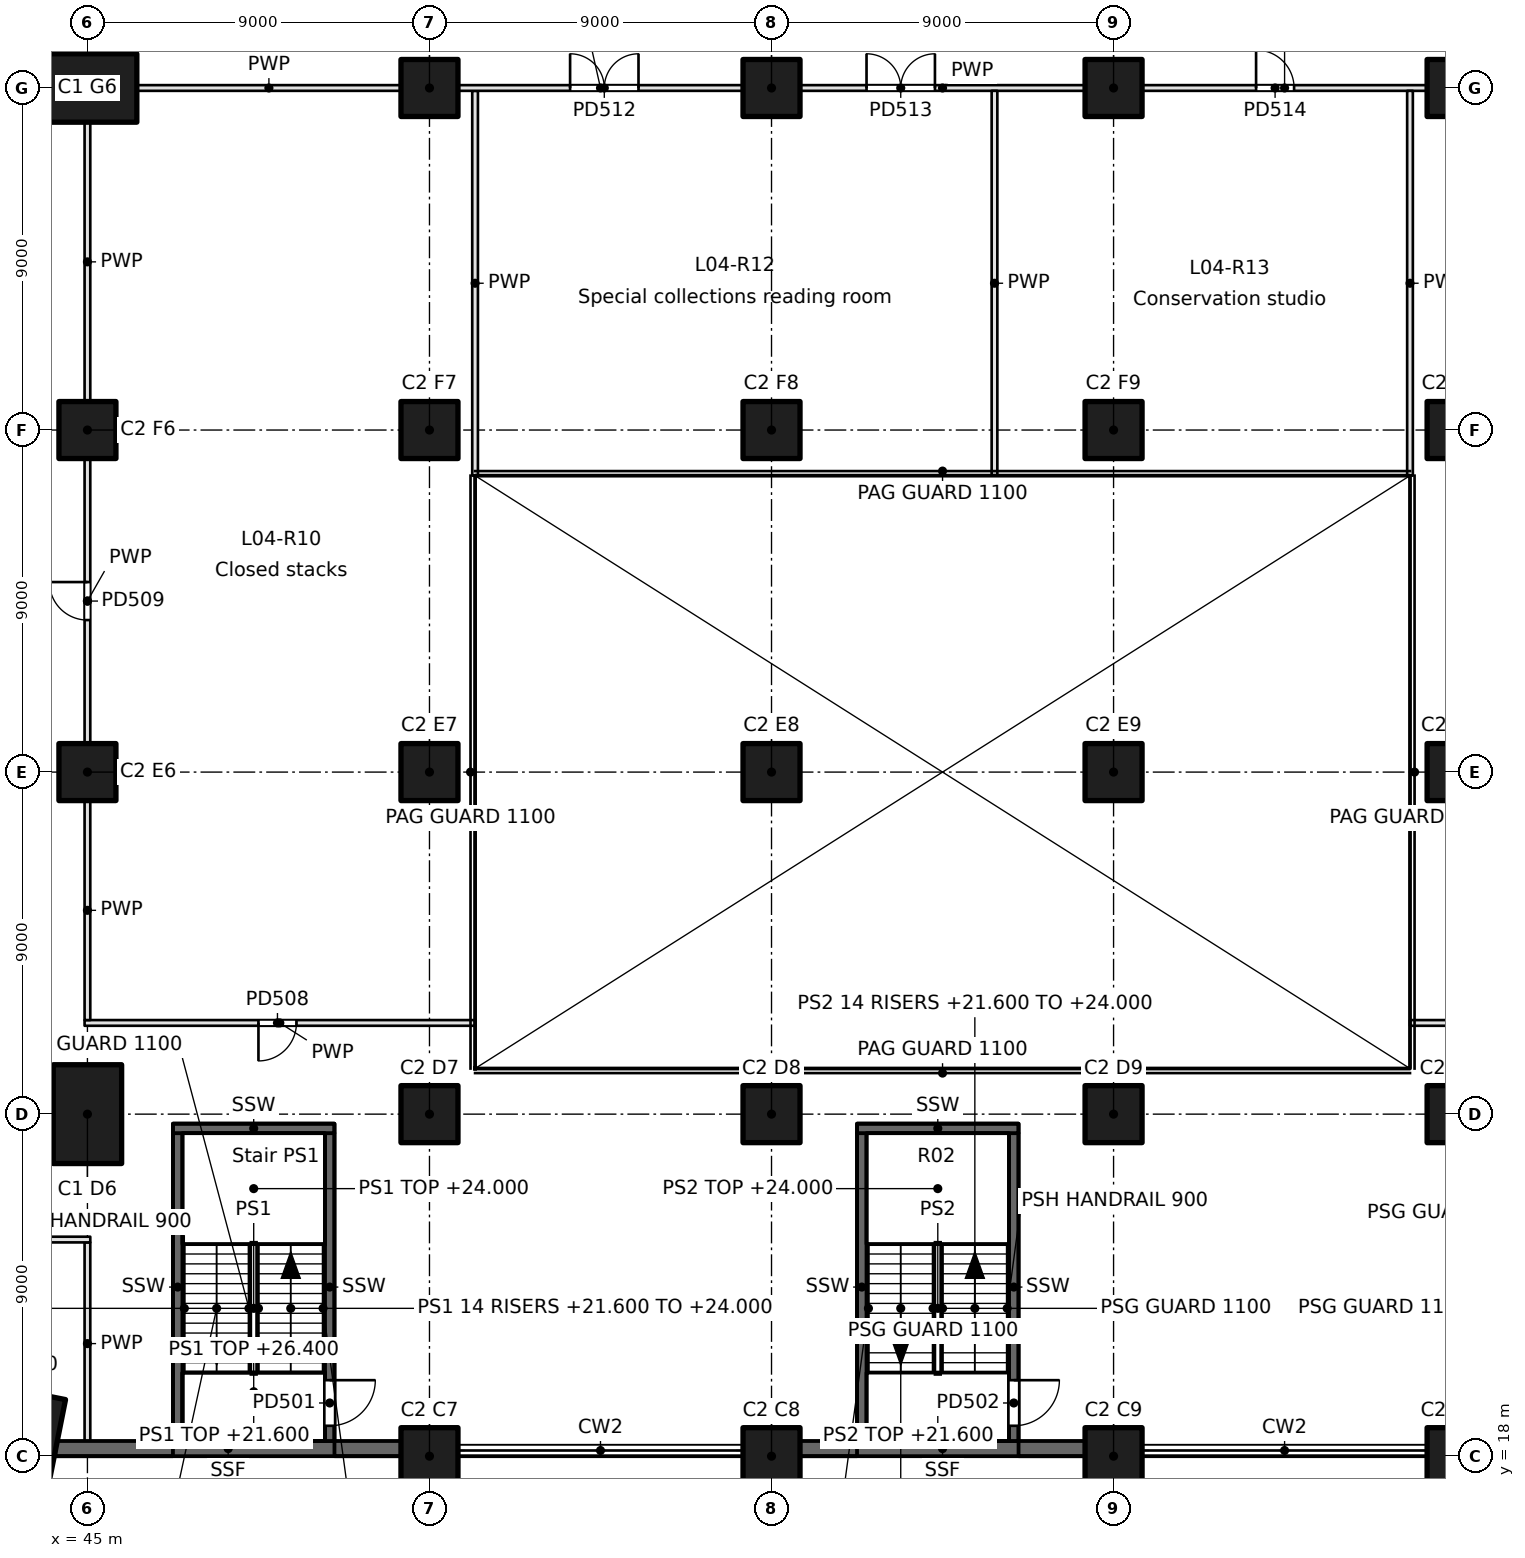
"""IFC4 building model, lengths in metres.
Left out: names, types, materials, properties, quantities, classifications, styles, units other than length and angle.
Written with IfcOpenShell. Run it as: python <this file> out.ifc"""

import sys

from ifc_helpers import new_model, si_unit, direction, frame, frame_2d, origin, origin_2d, place, context, subcontext, project, spatial, rectangle, extrude, element, fill, save


model = new_model("IFC4")
c1 = context("Model", 3, precision=1e-05, world=origin(), true_north=direction((0.0, 1.0)))
c2 = subcontext(c1, "Body", "Model", "MODEL_VIEW")
j1 = project(units=[si_unit("LENGTHUNIT", "METRE"), si_unit("PLANEANGLEUNIT", "RADIAN")], contexts=[c1])
p1 = place(None, origin())
s1 = spatial("IfcSite", under=j1, at=p1, CompositionType="ELEMENT")
p2 = place(p1, origin())
s2 = spatial("IfcBuilding", under=s1, at=p2, CompositionType="ELEMENT")
p3 = place(p2, frame((0.0, 0.0, 21.6)))
s3 = spatial("IfcBuildingStorey", under=s2, at=p3, CompositionType="ELEMENT", Elevation=21.6)
for number, where, z_axis, x_axis in (
    (1, (43.287, 18.39, 0.0), (0.0, 0.0, 1.0), (0.195, 0.981, 0.0)),
    (2, (45.0, 27.0, 0.0), (0.0, 0.0, 1.0), (0.0, 1.0, 0.0)),
):
    element("IfcColumn", number, at=place(p3, frame(where, z_axis=z_axis, x_axis=x_axis)), inside=s3, PredefinedType="COLUMN", context=c2, shape_type="SweptSolid", body=[
        extrude(rectangle(XDim=2.6, YDim=1.8, at=origin_2d()), origin(), (0.0, 0.0, 1.0), 4.8),
    ])
for number, where, z_axis, x_axis in (
    (3, (45.0, 36.0, 0.0), (0.0, 0.0, 1.0), (1.0, 0.0, 0.0)),
    (4, (45.0, 45.0, 0.0), (0.0, 0.0, 1.0), (1.0, 0.0, 0.0)),
):
    element("IfcColumn", number, at=place(p3, frame(where, z_axis=z_axis, x_axis=x_axis)), inside=s3, PredefinedType="COLUMN", context=c2, shape_type="SweptSolid", body=[
        extrude(rectangle(XDim=1.5, YDim=1.5, at=origin_2d()), origin(), (0.0, 0.0, 1.0), 4.8),
    ])
p4 = place(p3, frame((45.0, 54.0, 0.0), z_axis=(0.0, 0.0, 1.0), x_axis=(1.0, 0.0, 0.0)))
e5 = element("IfcColumn", 5, at=p4, inside=s3, PredefinedType="COLUMN", context=c2, shape_type="SweptSolid", body=[
    extrude(rectangle(XDim=2.6, YDim=1.8, at=origin_2d()), origin(), (0.0, 0.0, 1.0), 4.8),
])
for number, where, z_axis, x_axis in (
    (6, (54.0, 54.0, 0.0), (0.0, 0.0, 1.0), (1.0, 0.0, 0.0)),
    (7, (63.0, 54.0, 0.0), (0.0, 0.0, 1.0), (1.0, 0.0, 0.0)),
    (8, (72.0, 54.0, 0.0), (0.0, 0.0, 1.0), (1.0, 0.0, 0.0)),
    (9, (81.0, 54.0, 0.0), (0.0, 0.0, 1.0), (1.0, 0.0, 0.0)),
    (10, (54.0, 18.0, 0.0), (0.0, 0.0, 1.0), (1.0, 0.0, 0.0)),
    (11, (63.0, 18.0, 0.0), (0.0, 0.0, 1.0), (1.0, 0.0, 0.0)),
    (12, (72.0, 18.0, 0.0), (0.0, 0.0, 1.0), (1.0, 0.0, 0.0)),
    (13, (81.0, 18.0, 0.0), (0.0, 0.0, 1.0), (1.0, 0.0, 0.0)),
    (14, (54.0, 27.0, 0.0), (0.0, 0.0, 1.0), (1.0, 0.0, 0.0)),
    (15, (54.0, 36.0, 0.0), (0.0, 0.0, 1.0), (1.0, 0.0, 0.0)),
    (16, (54.0, 45.0, 0.0), (0.0, 0.0, 1.0), (1.0, 0.0, 0.0)),
    (17, (63.0, 27.0, 0.0), (0.0, 0.0, 1.0), (1.0, 0.0, 0.0)),
    (18, (63.0, 36.0, 0.0), (0.0, 0.0, 1.0), (1.0, 0.0, 0.0)),
    (19, (63.0, 45.0, 0.0), (0.0, 0.0, 1.0), (1.0, 0.0, 0.0)),
    (20, (72.0, 27.0, 0.0), (0.0, 0.0, 1.0), (1.0, 0.0, 0.0)),
    (21, (72.0, 36.0, 0.0), (0.0, 0.0, 1.0), (1.0, 0.0, 0.0)),
    (22, (72.0, 45.0, 0.0), (0.0, 0.0, 1.0), (1.0, 0.0, 0.0)),
    (23, (81.0, 27.0, 0.0), (0.0, 0.0, 1.0), (1.0, 0.0, 0.0)),
    (24, (81.0, 36.0, 0.0), (0.0, 0.0, 1.0), (1.0, 0.0, 0.0)),
    (25, (81.0, 45.0, 0.0), (0.0, 0.0, 1.0), (1.0, 0.0, 0.0)),
):
    element("IfcColumn", number, at=place(p3, frame(where, z_axis=z_axis, x_axis=x_axis)), inside=s3, PredefinedType="COLUMN", context=c2, shape_type="SweptSolid", body=[
        extrude(rectangle(XDim=1.5, YDim=1.5, at=origin_2d()), origin(), (0.0, 0.0, 1.0), 4.8),
    ])
p5 = place(p3, frame((47.375, 18.4, 0.0), z_axis=(0.0, 0.0, 1.0), x_axis=(0.0, 1.0, 0.0)))
e26 = element("IfcWall", 26, at=p5, inside=s3, PredefinedType="SOLIDWALL", context=c2, shape_type="SweptSolid", body=[
    extrude(rectangle(XDim=8.1, YDim=0.25, at=frame_2d((4.05, 0.0))), origin(), (0.0, 0.0, 1.0), 4.8),
])
p6 = place(p3, frame((51.375, 26.5, 0.0), z_axis=(0.0, 0.0, 1.0), x_axis=(0.0, -1.0, 0.0)))
e27 = element("IfcWall", 27, at=p6, inside=s3, PredefinedType="SOLIDWALL", context=c2, shape_type="SweptSolid", body=[
    extrude(rectangle(XDim=8.1, YDim=0.25, at=frame_2d((4.05, 0.0))), origin(), (0.0, 0.0, 1.0), 4.8),
])
p7 = place(p6, frame((6.5, 0.0, 0.0)))
e28 = element("IfcOpeningElement", 28, at=p7, cuts=e27, PredefinedType="OPENING", context=c2, shape_type="SweptSolid", body=[
    extrude(rectangle(XDim=1.2, YDim=2.1, at=frame_2d((0.6, 1.05))), frame((0.0, 0.125, 0.0), z_axis=(0.0, -1.0, 0.0), x_axis=(1.0, 0.0, 0.0)), (0.0, 0.0, 1.0), 0.25),
])
p8 = place(p3, frame((47.25, 26.625, 0.0), z_axis=(0.0, 0.0, 1.0), x_axis=(1.0, 0.0, 0.0)))
e29 = element("IfcWall", 29, at=p8, inside=s3, PredefinedType="SOLIDWALL", context=c2, shape_type="SweptSolid", body=[
    extrude(rectangle(XDim=4.25, YDim=0.25, at=frame_2d((2.125, 0.0))), origin(), (0.0, 0.0, 1.0), 4.8),
])
p9 = place(p3, frame((65.375, 18.4, 0.0), z_axis=(0.0, 0.0, 1.0), x_axis=(0.0, 1.0, 0.0)))
e30 = element("IfcWall", 30, at=p9, inside=s3, PredefinedType="SOLIDWALL", context=c2, shape_type="SweptSolid", body=[
    extrude(rectangle(XDim=8.1, YDim=0.25, at=frame_2d((4.05, 0.0))), origin(), (0.0, 0.0, 1.0), 4.8),
])
p10 = place(p3, frame((69.375, 26.5, 0.0), z_axis=(0.0, 0.0, 1.0), x_axis=(0.0, -1.0, 0.0)))
e31 = element("IfcWall", 31, at=p10, inside=s3, PredefinedType="SOLIDWALL", context=c2, shape_type="SweptSolid", body=[
    extrude(rectangle(XDim=8.1, YDim=0.25, at=frame_2d((4.05, 0.0))), origin(), (0.0, 0.0, 1.0), 4.8),
])
p11 = place(p10, frame((6.5, 0.0, 0.0)))
e32 = element("IfcOpeningElement", 32, at=p11, cuts=e31, PredefinedType="OPENING", context=c2, shape_type="SweptSolid", body=[
    extrude(rectangle(XDim=1.2, YDim=2.1, at=frame_2d((0.6, 1.05))), frame((0.0, 0.125, 0.0), z_axis=(0.0, -1.0, 0.0), x_axis=(1.0, 0.0, 0.0)), (0.0, 0.0, 1.0), 0.25),
])
p12 = place(p3, frame((65.25, 26.625, 0.0), z_axis=(0.0, 0.0, 1.0), x_axis=(1.0, 0.0, 0.0)))
e33 = element("IfcWall", 33, at=p12, inside=s3, PredefinedType="SOLIDWALL", context=c2, shape_type="SweptSolid", body=[
    extrude(rectangle(XDim=4.25, YDim=0.25, at=frame_2d((2.125, 0.0))), origin(), (0.0, 0.0, 1.0), 4.8),
])
p13 = place(p3, frame((53.25, 18.2, 0.0), z_axis=(0.0, 0.0, 1.0), x_axis=(-1.0, 0.0, 0.0)))
e34 = element("IfcWall", 34, at=p13, inside=s3, PredefinedType="SOLIDWALL", context=c2, shape_type="SweptSolid", body=[
    extrude(rectangle(XDim=9.093, YDim=0.4, at=frame_2d((4.546, 0.0))), origin(), (0.0, 0.0, 1.0), 4.45),
])
p14 = place(p3, frame((71.25, 18.2, 0.0), z_axis=(0.0, 0.0, 1.0), x_axis=(-1.0, 0.0, 0.0)))
e35 = element("IfcWall", 35, at=p14, inside=s3, PredefinedType="SOLIDWALL", context=c2, shape_type="SweptSolid", body=[
    extrude(rectangle(XDim=7.5, YDim=0.4, at=frame_2d((3.75, 0.0))), origin(), (0.0, 0.0, 1.0), 4.45),
])
p15 = place(p3, frame((55.2, 43.8, 0.0), z_axis=(0.0, 0.0, 1.0), x_axis=(0.0, 1.0, 0.0)))
e36 = element("IfcWall", 36, at=p15, inside=s3, PredefinedType="PARTITIONING", context=c2, shape_type="SweptSolid", body=[
    extrude(rectangle(XDim=10.125, YDim=0.15, at=frame_2d((5.062, 0.0))), origin(), (0.0, 0.0, 1.0), 4.45),
])
p16 = place(p3, frame((55.2, 29.4, 0.0), z_axis=(0.0, 0.0, 1.0), x_axis=(-1.0, 0.0, 0.0)))
e37 = element("IfcWall", 37, at=p16, inside=s3, PredefinedType="PARTITIONING", context=c2, shape_type="SweptSolid", body=[
    extrude(rectangle(XDim=10.275, YDim=0.15, at=frame_2d((5.137, 0.0))), origin(), (0.0, 0.0, 1.0), 4.45),
])
p17 = place(p16, frame((4.7, 0.0, 0.0)))
e38 = element("IfcOpeningElement", 38, at=p17, cuts=e37, PredefinedType="OPENING", context=c2, shape_type="SweptSolid", body=[
    extrude(rectangle(XDim=1.0, YDim=2.1, at=frame_2d((0.5, 1.05))), frame((0.0, 0.075, 0.0), z_axis=(0.0, -1.0, 0.0), x_axis=(1.0, 0.0, 0.0)), (0.0, 0.0, 1.0), 0.15),
])
p18 = place(p3, frame((89.82, 29.4, 0.0), z_axis=(0.0, 0.0, 1.0), x_axis=(-1.0, 0.0, 0.0)))
e39 = element("IfcWall", 39, at=p18, inside=s3, PredefinedType="PARTITIONING", context=c2, shape_type="SweptSolid", body=[
    extrude(rectangle(XDim=10.02, YDim=0.15, at=frame_2d((5.01, 0.0))), origin(), (0.0, 0.0, 1.0), 4.45),
])
p19 = place(p18, frame((4.52, 0.0, 0.0)))
e40 = element("IfcOpeningElement", 40, at=p19, cuts=e39, PredefinedType="OPENING", context=c2, shape_type="SweptSolid", body=[
    extrude(rectangle(XDim=1.0, YDim=2.1, at=frame_2d((0.5, 1.05))), frame((0.0, 0.075, 0.0), z_axis=(0.0, -1.0, 0.0), x_axis=(1.0, 0.0, 0.0)), (0.0, 0.0, 1.0), 0.15),
])
p20 = place(p3, frame((45.0, 23.625, 0.0), z_axis=(0.0, 0.0, 1.0), x_axis=(0.0, -1.0, 0.0)))
e41 = element("IfcWall", 41, at=p20, inside=s3, PredefinedType="PARTITIONING", context=c2, shape_type="SweptSolid", body=[
    extrude(rectangle(XDim=5.325, YDim=0.15, at=frame_2d((2.663, 0.0))), origin(), (0.0, 0.0, 1.0), 4.45),
])
p21 = place(p3, frame((45.0, 29.475, 0.0), z_axis=(0.0, 0.0, 1.0), x_axis=(0.0, 1.0, 0.0)))
e42 = element("IfcWall", 42, at=p21, inside=s3, PredefinedType="PARTITIONING", context=c2, shape_type="SweptSolid", body=[
    extrude(rectangle(XDim=5.775, YDim=0.15, at=frame_2d((2.887, 0.0))), origin(), (0.0, 0.0, 1.0), 4.45),
])
p22 = place(p3, frame((45.0, 36.75, 0.0), z_axis=(0.0, 0.0, 1.0), x_axis=(0.0, 1.0, 0.0)))
e43 = element("IfcWall", 43, at=p22, inside=s3, PredefinedType="PARTITIONING", context=c2, shape_type="SweptSolid", body=[
    extrude(rectangle(XDim=7.5, YDim=0.15, at=frame_2d((3.75, 0.0))), origin(), (0.0, 0.0, 1.0), 4.45),
])
p23 = place(p22, frame((3.25, 0.0, 0.0)))
e44 = element("IfcOpeningElement", 44, at=p23, cuts=e43, PredefinedType="OPENING", context=c2, shape_type="SweptSolid", body=[
    extrude(rectangle(XDim=1.0, YDim=2.1, at=frame_2d((0.5, 1.05))), frame((0.0, 0.075, 0.0), z_axis=(0.0, -1.0, 0.0), x_axis=(1.0, 0.0, 0.0)), (0.0, 0.0, 1.0), 0.15),
])
p24 = place(p3, frame((45.0, 45.75, 0.0), z_axis=(0.0, 0.0, 1.0), x_axis=(0.0, 1.0, 0.0)))
e45 = element("IfcWall", 45, at=p24, inside=s3, PredefinedType="PARTITIONING", context=c2, shape_type="SweptSolid", body=[
    extrude(rectangle(XDim=7.35, YDim=0.15, at=frame_2d((3.675, 0.0))), origin(), (0.0, 0.0, 1.0), 4.45),
])
p25 = place(p3, frame((46.3, 54.0, 0.0), z_axis=(0.0, 0.0, 1.0), x_axis=(1.0, 0.0, 0.0)))
e46 = element("IfcWall", 46, at=p25, inside=s3, PredefinedType="PARTITIONING", context=c2, shape_type="SweptSolid", body=[
    extrude(rectangle(XDim=6.95, YDim=0.15, at=frame_2d((3.475, 0.0))), origin(), (0.0, 0.0, 1.0), 4.45),
])
p26 = place(p3, frame((54.75, 54.0, 0.0), z_axis=(0.0, 0.0, 1.0), x_axis=(1.0, 0.0, 0.0)))
e47 = element("IfcWall", 47, at=p26, inside=s3, PredefinedType="PARTITIONING", context=c2, shape_type="SweptSolid", body=[
    extrude(rectangle(XDim=7.5, YDim=0.15, at=frame_2d((3.75, 0.0))), origin(), (0.0, 0.0, 1.0), 4.45),
])
p27 = place(p26, frame((2.95, 0.0, 0.0)))
e48 = element("IfcOpeningElement", 48, at=p27, cuts=e47, PredefinedType="OPENING", context=c2, shape_type="SweptSolid", body=[
    extrude(rectangle(XDim=1.8, YDim=2.1, at=frame_2d((0.9, 1.05))), frame((0.0, 0.075, 0.0), z_axis=(0.0, -1.0, 0.0), x_axis=(1.0, 0.0, 0.0)), (0.0, 0.0, 1.0), 0.15),
])
p28 = place(p3, frame((63.75, 54.0, 0.0), z_axis=(0.0, 0.0, 1.0), x_axis=(1.0, 0.0, 0.0)))
e49 = element("IfcWall", 49, at=p28, inside=s3, PredefinedType="PARTITIONING", context=c2, shape_type="SweptSolid", body=[
    extrude(rectangle(XDim=7.5, YDim=0.15, at=frame_2d((3.75, 0.0))), origin(), (0.0, 0.0, 1.0), 4.45),
])
p29 = place(p28, frame((1.75, 0.0, 0.0)))
e50 = element("IfcOpeningElement", 50, at=p29, cuts=e49, PredefinedType="OPENING", context=c2, shape_type="SweptSolid", body=[
    extrude(rectangle(XDim=1.8, YDim=2.1, at=frame_2d((0.9, 1.05))), frame((0.0, 0.075, 0.0), z_axis=(0.0, -1.0, 0.0), x_axis=(1.0, 0.0, 0.0)), (0.0, 0.0, 1.0), 0.15),
])
p30 = place(p3, frame((72.75, 54.0, 0.0), z_axis=(0.0, 0.0, 1.0), x_axis=(1.0, 0.0, 0.0)))
e51 = element("IfcWall", 51, at=p30, inside=s3, PredefinedType="PARTITIONING", context=c2, shape_type="SweptSolid", body=[
    extrude(rectangle(XDim=7.5, YDim=0.15, at=frame_2d((3.75, 0.0))), origin(), (0.0, 0.0, 1.0), 4.45),
])
p31 = place(p30, frame((3.0, 0.0, 0.0)))
e52 = element("IfcOpeningElement", 52, at=p31, cuts=e51, PredefinedType="OPENING", context=c2, shape_type="SweptSolid", body=[
    extrude(rectangle(XDim=1.0, YDim=2.1, at=frame_2d((0.5, 1.05))), frame((0.0, 0.075, 0.0), z_axis=(0.0, -1.0, 0.0), x_axis=(1.0, 0.0, 0.0)), (0.0, 0.0, 1.0), 0.15),
])
for number, where, z_axis, x_axis in (
    (53, (79.8, 43.8, 0.0), (0.0, 0.0, 1.0), (0.0, 1.0, 0.0)),
    (54, (68.867, 43.8, 0.0), (0.0, 0.0, 1.0), (0.0, 1.0, 0.0)),
):
    element("IfcWall", number, at=place(p3, frame(where, z_axis=z_axis, x_axis=x_axis)), inside=s3, PredefinedType="PARTITIONING", context=c2, shape_type="SweptSolid", body=[
        extrude(rectangle(XDim=10.125, YDim=0.15, at=frame_2d((5.062, 0.0))), origin(), (0.0, 0.0, 1.0), 4.45),
    ])
p32 = place(p3, frame((21.58, 23.7, 0.0), z_axis=(0.0, 0.0, 1.0), x_axis=(1.0, 0.0, 0.0)))
e55 = element("IfcWall", 55, at=p32, inside=s3, PredefinedType="PARTITIONING", context=c2, shape_type="SweptSolid", body=[
    extrude(rectangle(XDim=23.495, YDim=0.15, at=frame_2d((11.748, 0.0))), origin(), (0.0, 0.0, 1.0), 4.45),
])
p33 = place(p32, frame((1.25, 0.0, 0.0)))
e56 = element("IfcOpeningElement", 56, at=p33, cuts=e55, PredefinedType="OPENING", context=c2, shape_type="SweptSolid", body=[
    extrude(rectangle(XDim=1.8, YDim=2.1, at=frame_2d((0.9, 1.05))), frame((0.0, 0.075, 0.0), z_axis=(0.0, -1.0, 0.0), x_axis=(1.0, 0.0, 0.0)), (0.0, 0.0, 1.0), 0.15),
])
p34 = place(p32, frame((8.634, 0.0, 0.0)))
e57 = element("IfcOpeningElement", 57, at=p34, cuts=e55, PredefinedType="OPENING", context=c2, shape_type="SweptSolid", body=[
    extrude(rectangle(XDim=1.8, YDim=2.1, at=frame_2d((0.9, 1.05))), frame((0.0, 0.075, 0.0), z_axis=(0.0, -1.0, 0.0), x_axis=(1.0, 0.0, 0.0)), (0.0, 0.0, 1.0), 0.15),
])
p35 = place(p32, frame((18.599, 0.0, 0.0)))
e58 = element("IfcOpeningElement", 58, at=p35, cuts=e55, PredefinedType="OPENING", context=c2, shape_type="SweptSolid", body=[
    extrude(rectangle(XDim=1.0, YDim=2.1, at=frame_2d((0.5, 1.05))), frame((0.0, 0.075, 0.0), z_axis=(0.0, -1.0, 0.0), x_axis=(1.0, 0.0, 0.0)), (0.0, 0.0, 1.0), 0.15),
])
p36 = place(p7, origin())
e59 = element("IfcDoor", 59, at=p36, inside=s3, OperationType="SINGLE_SWING_LEFT", PredefinedType="DOOR", context=c2, shape_type="SweptSolid", body=[
    extrude(rectangle(XDim=1.2, YDim=2.1, at=frame_2d((0.6, 1.05))), frame((0.0, 0.025, 0.0), z_axis=(0.0, -1.0, 0.0), x_axis=(1.0, 0.0, 0.0)), (0.0, 0.0, 1.0), 0.05),
])
fill(e28, e59)
p37 = place(p11, origin())
e60 = element("IfcDoor", 60, at=p37, inside=s3, OperationType="SINGLE_SWING_LEFT", PredefinedType="DOOR", context=c2, shape_type="SweptSolid", body=[
    extrude(rectangle(XDim=1.2, YDim=2.1, at=frame_2d((0.6, 1.05))), frame((0.0, 0.025, 0.0), z_axis=(0.0, -1.0, 0.0), x_axis=(1.0, 0.0, 0.0)), (0.0, 0.0, 1.0), 0.05),
])
fill(e32, e60)
p38 = place(p17, origin())
e61 = element("IfcDoor", 61, at=p38, inside=s3, OperationType="SINGLE_SWING_RIGHT", PredefinedType="DOOR", context=c2, shape_type="SweptSolid", body=[
    extrude(rectangle(XDim=1.0, YDim=2.1, at=frame_2d((0.5, 1.05))), frame((0.0, 0.025, 0.0), z_axis=(0.0, -1.0, 0.0), x_axis=(1.0, 0.0, 0.0)), (0.0, 0.0, 1.0), 0.05),
])
fill(e38, e61)
p39 = place(p23, origin())
e62 = element("IfcDoor", 62, at=p39, inside=s3, OperationType="SINGLE_SWING_RIGHT", PredefinedType="DOOR", context=c2, shape_type="SweptSolid", body=[
    extrude(rectangle(XDim=1.0, YDim=2.1, at=frame_2d((0.5, 1.05))), frame((0.0, 0.025, 0.0), z_axis=(0.0, -1.0, 0.0), x_axis=(1.0, 0.0, 0.0)), (0.0, 0.0, 1.0), 0.05),
])
fill(e44, e62)
p40 = place(p27, origin())
e63 = element("IfcDoor", 63, at=p40, inside=s3, OperationType="DOUBLE_DOOR_SINGLE_SWING", PredefinedType="DOOR", context=c2, shape_type="SweptSolid", body=[
    extrude(rectangle(XDim=1.8, YDim=2.1, at=frame_2d((0.9, 1.05))), frame((0.0, 0.025, 0.0), z_axis=(0.0, -1.0, 0.0), x_axis=(1.0, 0.0, 0.0)), (0.0, 0.0, 1.0), 0.05),
])
fill(e48, e63)
p41 = place(p29, origin())
e64 = element("IfcDoor", 64, at=p41, inside=s3, OperationType="DOUBLE_DOOR_SINGLE_SWING", PredefinedType="DOOR", context=c2, shape_type="SweptSolid", body=[
    extrude(rectangle(XDim=1.8, YDim=2.1, at=frame_2d((0.9, 1.05))), frame((0.0, 0.025, 0.0), z_axis=(0.0, -1.0, 0.0), x_axis=(1.0, 0.0, 0.0)), (0.0, 0.0, 1.0), 0.05),
])
fill(e50, e64)
p42 = place(p31, origin())
e65 = element("IfcDoor", 65, at=p42, inside=s3, OperationType="SINGLE_SWING_LEFT", PredefinedType="DOOR", context=c2, shape_type="SweptSolid", body=[
    extrude(rectangle(XDim=1.0, YDim=2.1, at=frame_2d((0.5, 1.05))), frame((0.0, 0.025, 0.0), z_axis=(0.0, -1.0, 0.0), x_axis=(1.0, 0.0, 0.0)), (0.0, 0.0, 1.0), 0.05),
])
fill(e52, e65)
save(model, sys.argv[1])
